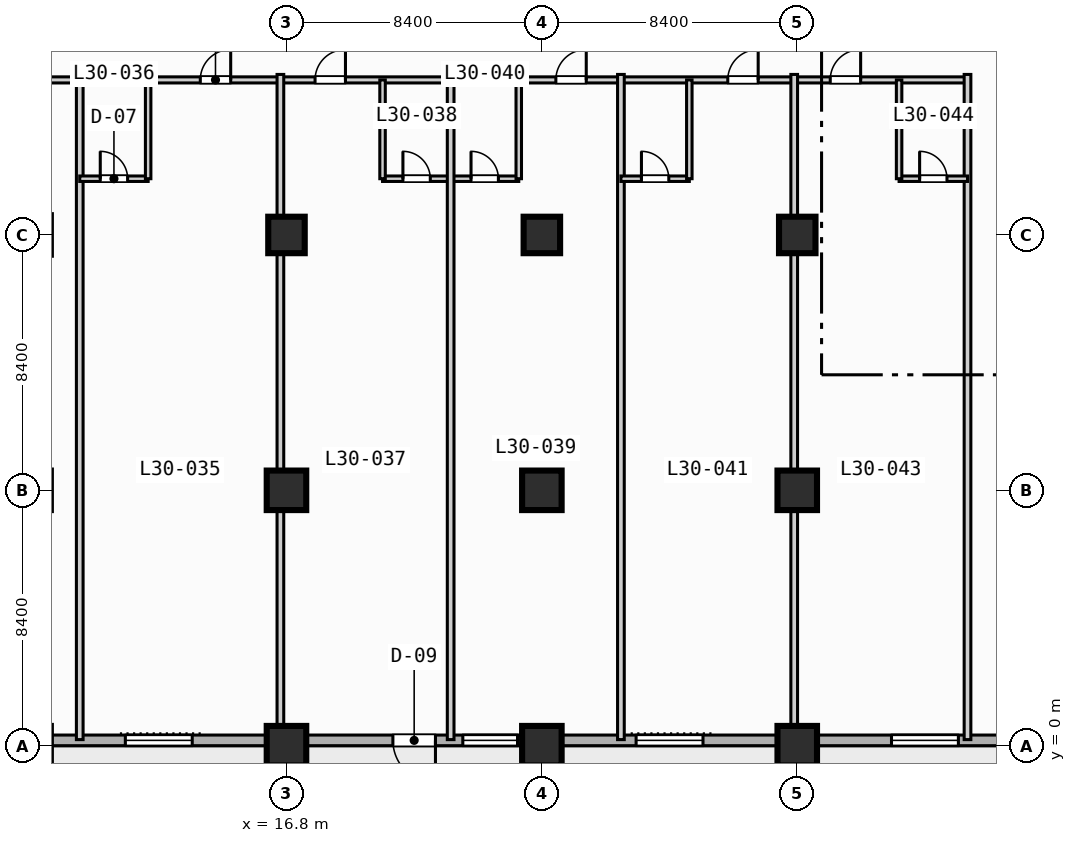
"""IFC4 building model, lengths in metres.
Left out: names, types, materials, properties, quantities, classifications, styles, units other than length and angle.
Written with IfcOpenShell. Run it as: python <this file> out.ifc"""

import sys

from ifc_helpers import new_model, si_unit, direction, frame, frame_2d, origin, origin_2d, place, context, subcontext, project, spatial, rectangle, extrude, element, fill, save


model = new_model("IFC4")
c1 = context("Model", 3, precision=1e-05, world=origin(), true_north=direction((0.0, 1.0)))
c2 = subcontext(c1, "Body", "Model", "MODEL_VIEW")
j1 = project(units=[si_unit("LENGTHUNIT", "METRE"), si_unit("PLANEANGLEUNIT", "RADIAN")], contexts=[c1])
p1 = place(None, origin())
s1 = spatial("IfcSite", under=j1, at=p1, CompositionType="ELEMENT")
p2 = place(p1, origin())
s2 = spatial("IfcBuilding", under=s1, at=p2, CompositionType="ELEMENT")
p3 = place(p2, frame((0.0, 0.0, 126.6)))
s3 = spatial("IfcBuildingStorey", under=s2, at=p3, CompositionType="ELEMENT", Elevation=126.6)
for number, where, z_axis, x_axis in (
    (1, (16.8, 0.0, 0.0), (0.0, 0.0, 1.0), (1.0, 0.0, 0.0)),
    (2, (16.8, 8.4, 0.0), (0.0, 0.0, 1.0), (1.0, 0.0, 0.0)),
):
    element("IfcColumn", number, at=place(p3, frame(where, z_axis=z_axis, x_axis=x_axis)), inside=s3, PredefinedType="COLUMN", context=c2, shape_type="SweptSolid", body=[
        extrude(rectangle(XDim=1.3, YDim=1.3, at=origin_2d()), origin(), (0.0, 0.0, 1.0), 3.8),
    ])
p4 = place(p3, frame((16.8, 16.8, 0.0), z_axis=(0.0, 0.0, 1.0), x_axis=(1.0, 0.0, 0.0)))
e3 = element("IfcColumn", 3, at=p4, inside=s3, PredefinedType="COLUMN", context=c2, shape_type="SweptSolid", body=[
    extrude(rectangle(XDim=1.2, YDim=1.2, at=origin_2d()), origin(), (0.0, 0.0, 1.0), 3.8),
])
for number, where, z_axis, x_axis in (
    (4, (25.2, 0.0, 0.0), (0.0, 0.0, 1.0), (1.0, 0.0, 0.0)),
    (5, (25.2, 8.4, 0.0), (0.0, 0.0, 1.0), (1.0, 0.0, 0.0)),
):
    element("IfcColumn", number, at=place(p3, frame(where, z_axis=z_axis, x_axis=x_axis)), inside=s3, PredefinedType="COLUMN", context=c2, shape_type="SweptSolid", body=[
        extrude(rectangle(XDim=1.3, YDim=1.3, at=origin_2d()), origin(), (0.0, 0.0, 1.0), 3.8),
    ])
p5 = place(p3, frame((25.2, 16.8, 0.0), z_axis=(0.0, 0.0, 1.0), x_axis=(1.0, 0.0, 0.0)))
e6 = element("IfcColumn", 6, at=p5, inside=s3, PredefinedType="COLUMN", context=c2, shape_type="SweptSolid", body=[
    extrude(rectangle(XDim=1.2, YDim=1.2, at=origin_2d()), origin(), (0.0, 0.0, 1.0), 3.8),
])
for number, where, z_axis, x_axis in (
    (7, (33.6, 0.0, 0.0), (0.0, 0.0, 1.0), (1.0, 0.0, 0.0)),
    (8, (33.6, 8.4, 0.0), (0.0, 0.0, 1.0), (1.0, 0.0, 0.0)),
):
    element("IfcColumn", number, at=place(p3, frame(where, z_axis=z_axis, x_axis=x_axis)), inside=s3, PredefinedType="COLUMN", context=c2, shape_type="SweptSolid", body=[
        extrude(rectangle(XDim=1.3, YDim=1.3, at=origin_2d()), origin(), (0.0, 0.0, 1.0), 3.8),
    ])
p6 = place(p3, frame((33.6, 16.8, 0.0), z_axis=(0.0, 0.0, 1.0), x_axis=(1.0, 0.0, 0.0)))
e9 = element("IfcColumn", 9, at=p6, inside=s3, PredefinedType="COLUMN", context=c2, shape_type="SweptSolid", body=[
    extrude(rectangle(XDim=1.2, YDim=1.2, at=origin_2d()), origin(), (0.0, 0.0, 1.0), 3.8),
])
p7 = place(p3, frame((72.425, 0.175, 0.0), z_axis=(0.0, 0.0, 1.0), x_axis=(-1.0, 0.0, 0.0)))
e10 = element("IfcWall", 10, at=p7, inside=s3, PredefinedType="STANDARD", context=c2, shape_type="SweptSolid", body=[
    extrude(rectangle(XDim=69.25, YDim=0.35, at=frame_2d((34.625, 0.0))), origin(), (0.0, 0.0, 1.0), 3.55),
])
p8 = place(p7, frame((50.725, 0.0, 0.0)))
e11 = element("IfcOpeningElement", 11, at=p8, cuts=e10, PredefinedType="OPENING", context=c2, shape_type="SweptSolid", body=[
    extrude(rectangle(XDim=1.4, YDim=2.2, at=frame_2d((0.7, 1.1))), frame((0.0, 0.185, 0.0), z_axis=(0.0, -1.0, 0.0), x_axis=(1.0, 0.0, 0.0)), (0.0, 0.0, 1.0), 0.37),
])
p9 = place(p7, frame((58.725, 0.0, 0.85)))
e12 = element("IfcOpeningElement", 12, at=p9, cuts=e10, PredefinedType="OPENING", context=c2, shape_type="SweptSolid", body=[
    extrude(rectangle(XDim=2.2, YDim=1.8, at=frame_2d((1.1, 0.9))), frame((0.0, 0.185, 0.0), z_axis=(0.0, -1.0, 0.0), x_axis=(1.0, 0.0, 0.0)), (0.0, 0.0, 1.0), 0.37),
])
p10 = place(p7, frame((41.925, 0.0, 0.85)))
e13 = element("IfcOpeningElement", 13, at=p10, cuts=e10, PredefinedType="OPENING", context=c2, shape_type="SweptSolid", body=[
    extrude(rectangle(XDim=2.2, YDim=1.8, at=frame_2d((1.1, 0.9))), frame((0.0, 0.185, 0.0), z_axis=(0.0, -1.0, 0.0), x_axis=(1.0, 0.0, 0.0)), (0.0, 0.0, 1.0), 0.37),
])
p11 = place(p7, frame((33.525, 0.0, 0.85)))
e14 = element("IfcOpeningElement", 14, at=p11, cuts=e10, PredefinedType="OPENING", context=c2, shape_type="SweptSolid", body=[
    extrude(rectangle(XDim=2.2, YDim=1.8, at=frame_2d((1.1, 0.9))), frame((0.0, 0.185, 0.0), z_axis=(0.0, -1.0, 0.0), x_axis=(1.0, 0.0, 0.0)), (0.0, 0.0, 1.0), 0.37),
])
p12 = place(p7, frame((25.125, 0.0, 0.85)))
e15 = element("IfcOpeningElement", 15, at=p12, cuts=e10, PredefinedType="OPENING", context=c2, shape_type="SweptSolid", body=[
    extrude(rectangle(XDim=2.2, YDim=1.8, at=frame_2d((1.1, 0.9))), frame((0.0, 0.185, 0.0), z_axis=(0.0, -1.0, 0.0), x_axis=(1.0, 0.0, 0.0)), (0.0, 0.0, 1.0), 0.37),
])
p13 = place(p7, frame((64.825, 0.0, 0.85)))
e16 = element("IfcOpeningElement", 16, at=p13, cuts=e10, PredefinedType="OPENING", context=c2, shape_type="SweptSolid", body=[
    extrude(rectangle(XDim=1.8, YDim=1.8, at=frame_2d((0.9, 0.9))), frame((0.0, 0.185, 0.0), z_axis=(0.0, -1.0, 0.0), x_axis=(1.0, 0.0, 0.0)), (0.0, 0.0, 1.0), 0.37),
])
p14 = place(p7, frame((48.025, 0.0, 0.85)))
e17 = element("IfcOpeningElement", 17, at=p14, cuts=e10, PredefinedType="OPENING", context=c2, shape_type="SweptSolid", body=[
    extrude(rectangle(XDim=1.8, YDim=1.8, at=frame_2d((0.9, 0.9))), frame((0.0, 0.185, 0.0), z_axis=(0.0, -1.0, 0.0), x_axis=(1.0, 0.0, 0.0)), (0.0, 0.0, 1.0), 0.37),
])
p15 = place(p3, frame((3.4, 21.9, 0.0), z_axis=(0.0, 0.0, 1.0), x_axis=(1.0, 0.0, 0.0)))
e18 = element("IfcWall", 18, at=p15, inside=s3, PredefinedType="PARTITIONING", context=c2, shape_type="SweptSolid", body=[
    extrude(rectangle(XDim=35.8, YDim=0.2, at=frame_2d((17.9, 0.0))), origin(), (0.0, 0.0, 1.0), 3.55),
])
p16 = place(p15, frame((3.965, 0.0, 0.0)))
e19 = element("IfcOpeningElement", 19, at=p16, cuts=e18, PredefinedType="OPENING", context=c2, shape_type="SweptSolid", body=[
    extrude(rectangle(XDim=1.0, YDim=2.15, at=frame_2d((0.5, 1.075))), frame((0.0, 0.11, 0.0), z_axis=(0.0, -1.0, 0.0), x_axis=(1.0, 0.0, 0.0)), (0.0, 0.0, 1.0), 0.22),
])
p17 = place(p15, frame((10.565, 0.0, 0.0)))
e20 = element("IfcOpeningElement", 20, at=p17, cuts=e18, PredefinedType="OPENING", context=c2, shape_type="SweptSolid", body=[
    extrude(rectangle(XDim=1.0, YDim=2.15, at=frame_2d((0.5, 1.075))), frame((0.0, 0.11, 0.0), z_axis=(0.0, -1.0, 0.0), x_axis=(1.0, 0.0, 0.0)), (0.0, 0.0, 1.0), 0.22),
])
p18 = place(p15, frame((14.34, 0.0, 0.0)))
e21 = element("IfcOpeningElement", 21, at=p18, cuts=e18, PredefinedType="OPENING", context=c2, shape_type="SweptSolid", body=[
    extrude(rectangle(XDim=1.0, YDim=2.15, at=frame_2d((0.5, 1.075))), frame((0.0, 0.11, 0.0), z_axis=(0.0, -1.0, 0.0), x_axis=(1.0, 0.0, 0.0)), (0.0, 0.0, 1.0), 0.22),
])
p19 = place(p15, frame((22.26, 0.0, 0.0)))
e22 = element("IfcOpeningElement", 22, at=p19, cuts=e18, PredefinedType="OPENING", context=c2, shape_type="SweptSolid", body=[
    extrude(rectangle(XDim=1.0, YDim=2.15, at=frame_2d((0.5, 1.075))), frame((0.0, 0.11, 0.0), z_axis=(0.0, -1.0, 0.0), x_axis=(1.0, 0.0, 0.0)), (0.0, 0.0, 1.0), 0.22),
])
p20 = place(p15, frame((27.915, 0.0, 0.0)))
e23 = element("IfcOpeningElement", 23, at=p20, cuts=e18, PredefinedType="OPENING", context=c2, shape_type="SweptSolid", body=[
    extrude(rectangle(XDim=1.0, YDim=2.15, at=frame_2d((0.5, 1.075))), frame((0.0, 0.11, 0.0), z_axis=(0.0, -1.0, 0.0), x_axis=(1.0, 0.0, 0.0)), (0.0, 0.0, 1.0), 0.22),
])
p21 = place(p15, frame((31.285, 0.0, 0.0)))
e24 = element("IfcOpeningElement", 24, at=p21, cuts=e18, PredefinedType="OPENING", context=c2, shape_type="SweptSolid", body=[
    extrude(rectangle(XDim=1.0, YDim=2.15, at=frame_2d((0.5, 1.075))), frame((0.0, 0.11, 0.0), z_axis=(0.0, -1.0, 0.0), x_axis=(1.0, 0.0, 0.0)), (0.0, 0.0, 1.0), 0.22),
])
p22 = place(p3, frame((10.0, 0.2, 0.0), z_axis=(0.0, 0.0, 1.0), x_axis=(0.0, 1.0, 0.0)))
e25 = element("IfcWall", 25, at=p22, inside=s3, PredefinedType="PARTITIONING", context=c2, shape_type="SweptSolid", body=[
    extrude(rectangle(XDim=21.88, YDim=0.22, at=frame_2d((10.94, 0.0))), origin(), (0.0, 0.0, 1.0), 3.55),
])
p23 = place(p3, frame((10.0, 18.65, 0.0), z_axis=(0.0, 0.0, 1.0), x_axis=(1.0, 0.0, 0.0)))
e26 = element("IfcWall", 26, at=p23, inside=s3, PredefinedType="PLUMBINGWALL", context=c2, shape_type="SweptSolid", body=[
    extrude(rectangle(XDim=2.25, YDim=0.18, at=frame_2d((1.125, 0.0))), origin(), (0.0, 0.0, 1.0), 3.55),
])
p24 = place(p23, frame((0.675, 0.0, 0.0)))
e27 = element("IfcOpeningElement", 27, at=p24, cuts=e26, PredefinedType="OPENING", context=c2, shape_type="SweptSolid", body=[
    extrude(rectangle(XDim=0.9, YDim=2.1, at=frame_2d((0.45, 1.05))), frame((0.0, 0.1, 0.0), z_axis=(0.0, -1.0, 0.0), x_axis=(1.0, 0.0, 0.0)), (0.0, 0.0, 1.0), 0.2),
])
p25 = place(p3, frame((12.25, 18.65, 0.0), z_axis=(0.0, 0.0, 1.0), x_axis=(0.0, 1.0, 0.0)))
e28 = element("IfcWall", 28, at=p25, inside=s3, PredefinedType="PLUMBINGWALL", context=c2, shape_type="SweptSolid", body=[
    extrude(rectangle(XDim=3.25, YDim=0.18, at=frame_2d((1.625, 0.0))), origin(), (0.0, 0.0, 1.0), 3.55),
])
p26 = place(p3, frame((16.6, 0.2, 0.0), z_axis=(0.0, 0.0, 1.0), x_axis=(0.0, 1.0, 0.0)))
e29 = element("IfcWall", 29, at=p26, inside=s3, PredefinedType="PARTITIONING", context=c2, shape_type="SweptSolid", body=[
    extrude(rectangle(XDim=21.88, YDim=0.22, at=frame_2d((10.94, 0.0))), origin(), (0.0, 0.0, 1.0), 2.8),
])
p27 = place(p3, frame((19.96, 18.65, 0.0), z_axis=(0.0, 0.0, 1.0), x_axis=(1.0, 0.0, 0.0)))
e30 = element("IfcWall", 30, at=p27, inside=s3, PredefinedType="PLUMBINGWALL", context=c2, shape_type="SweptSolid", body=[
    extrude(rectangle(XDim=4.48, YDim=0.18, at=frame_2d((2.24, 0.0))), origin(), (0.0, 0.0, 1.0), 3.55),
])
p28 = place(p27, frame((0.67, 0.0, 0.0)))
e31 = element("IfcOpeningElement", 31, at=p28, cuts=e30, PredefinedType="OPENING", context=c2, shape_type="SweptSolid", body=[
    extrude(rectangle(XDim=0.9, YDim=2.1, at=frame_2d((0.45, 1.05))), frame((0.0, 0.1, 0.0), z_axis=(0.0, -1.0, 0.0), x_axis=(1.0, 0.0, 0.0)), (0.0, 0.0, 1.0), 0.2),
])
p29 = place(p27, frame((2.91, 0.0, 0.0)))
e32 = element("IfcOpeningElement", 32, at=p29, cuts=e30, PredefinedType="OPENING", context=c2, shape_type="SweptSolid", body=[
    extrude(rectangle(XDim=0.9, YDim=2.1, at=frame_2d((0.45, 1.05))), frame((0.0, 0.1, 0.0), z_axis=(0.0, -1.0, 0.0), x_axis=(1.0, 0.0, 0.0)), (0.0, 0.0, 1.0), 0.2),
])
p30 = place(p3, frame((19.96, 18.65, 0.0), z_axis=(0.0, 0.0, 1.0), x_axis=(0.0, 1.0, 0.0)))
e33 = element("IfcWall", 33, at=p30, inside=s3, PredefinedType="PLUMBINGWALL", context=c2, shape_type="SweptSolid", body=[
    extrude(rectangle(XDim=3.25, YDim=0.18, at=frame_2d((1.625, 0.0))), origin(), (0.0, 0.0, 1.0), 3.55),
])
p31 = place(p3, frame((22.2, 0.2, 0.0), z_axis=(0.0, 0.0, 1.0), x_axis=(0.0, 1.0, 0.0)))
e34 = element("IfcWall", 34, at=p31, inside=s3, PredefinedType="PARTITIONING", context=c2, shape_type="SweptSolid", body=[
    extrude(rectangle(XDim=21.88, YDim=0.22, at=frame_2d((10.94, 0.0))), origin(), (0.0, 0.0, 1.0), 3.55),
])
p32 = place(p3, frame((24.44, 18.65, 0.0), z_axis=(0.0, 0.0, 1.0), x_axis=(0.0, 1.0, 0.0)))
e35 = element("IfcWall", 35, at=p32, inside=s3, PredefinedType="PLUMBINGWALL", context=c2, shape_type="SweptSolid", body=[
    extrude(rectangle(XDim=3.25, YDim=0.18, at=frame_2d((1.625, 0.0))), origin(), (0.0, 0.0, 1.0), 3.55),
])
p33 = place(p3, frame((27.8, 0.2, 0.0), z_axis=(0.0, 0.0, 1.0), x_axis=(0.0, 1.0, 0.0)))
e36 = element("IfcWall", 36, at=p33, inside=s3, PredefinedType="PARTITIONING", context=c2, shape_type="SweptSolid", body=[
    extrude(rectangle(XDim=21.88, YDim=0.22, at=frame_2d((10.94, 0.0))), origin(), (0.0, 0.0, 1.0), 3.55),
])
p34 = place(p3, frame((27.8, 18.65, 0.0), z_axis=(0.0, 0.0, 1.0), x_axis=(1.0, 0.0, 0.0)))
e37 = element("IfcWall", 37, at=p34, inside=s3, PredefinedType="PLUMBINGWALL", context=c2, shape_type="SweptSolid", body=[
    extrude(rectangle(XDim=2.25, YDim=0.18, at=frame_2d((1.125, 0.0))), origin(), (0.0, 0.0, 1.0), 3.55),
])
p35 = place(p34, frame((0.675, 0.0, 0.0)))
e38 = element("IfcOpeningElement", 38, at=p35, cuts=e37, PredefinedType="OPENING", context=c2, shape_type="SweptSolid", body=[
    extrude(rectangle(XDim=0.9, YDim=2.1, at=frame_2d((0.45, 1.05))), frame((0.0, 0.1, 0.0), z_axis=(0.0, -1.0, 0.0), x_axis=(1.0, 0.0, 0.0)), (0.0, 0.0, 1.0), 0.2),
])
p36 = place(p3, frame((30.05, 18.65, 0.0), z_axis=(0.0, 0.0, 1.0), x_axis=(0.0, 1.0, 0.0)))
e39 = element("IfcWall", 39, at=p36, inside=s3, PredefinedType="PLUMBINGWALL", context=c2, shape_type="SweptSolid", body=[
    extrude(rectangle(XDim=3.25, YDim=0.18, at=frame_2d((1.625, 0.0))), origin(), (0.0, 0.0, 1.0), 3.55),
])
p37 = place(p3, frame((33.5, 0.2, 0.0), z_axis=(0.0, 0.0, 1.0), x_axis=(0.0, 1.0, 0.0)))
e40 = element("IfcWall", 40, at=p37, inside=s3, PredefinedType="PARTITIONING", context=c2, shape_type="SweptSolid", body=[
    extrude(rectangle(XDim=21.88, YDim=0.22, at=frame_2d((10.94, 0.0))), origin(), (0.0, 0.0, 1.0), 2.8),
])
p38 = place(p3, frame((39.2, 0.2, 0.0), z_axis=(0.0, 0.0, 1.0), x_axis=(0.0, 1.0, 0.0)))
e41 = element("IfcWall", 41, at=p38, inside=s3, PredefinedType="PARTITIONING", context=c2, shape_type="SweptSolid", body=[
    extrude(rectangle(XDim=21.88, YDim=0.22, at=frame_2d((10.94, 0.0))), origin(), (0.0, 0.0, 1.0), 3.55),
])
p39 = place(p3, frame((36.95, 18.65, 0.0), z_axis=(0.0, 0.0, 1.0), x_axis=(1.0, 0.0, 0.0)))
e42 = element("IfcWall", 42, at=p39, inside=s3, PredefinedType="PLUMBINGWALL", context=c2, shape_type="SweptSolid", body=[
    extrude(rectangle(XDim=2.25, YDim=0.18, at=frame_2d((1.125, 0.0))), origin(), (0.0, 0.0, 1.0), 3.55),
])
p40 = place(p39, frame((0.675, 0.0, 0.0)))
e43 = element("IfcOpeningElement", 43, at=p40, cuts=e42, PredefinedType="OPENING", context=c2, shape_type="SweptSolid", body=[
    extrude(rectangle(XDim=0.9, YDim=2.1, at=frame_2d((0.45, 1.05))), frame((0.0, 0.1, 0.0), z_axis=(0.0, -1.0, 0.0), x_axis=(1.0, 0.0, 0.0)), (0.0, 0.0, 1.0), 0.2),
])
p41 = place(p3, frame((36.95, 18.65, 0.0), z_axis=(0.0, 0.0, 1.0), x_axis=(0.0, 1.0, 0.0)))
e44 = element("IfcWall", 44, at=p41, inside=s3, PredefinedType="PLUMBINGWALL", context=c2, shape_type="SweptSolid", body=[
    extrude(rectangle(XDim=3.25, YDim=0.18, at=frame_2d((1.625, 0.0))), origin(), (0.0, 0.0, 1.0), 3.55),
])
p42 = place(p8, origin())
e45 = element("IfcDoor", 45, at=p42, inside=s3, OperationType="SINGLE_SWING_LEFT", PredefinedType="DOOR", context=c2, shape_type="SweptSolid", body=[
    extrude(rectangle(XDim=1.4, YDim=2.2, at=frame_2d((0.7, 1.1))), frame((0.0, 0.025, 0.0), z_axis=(0.0, -1.0, 0.0), x_axis=(1.0, 0.0, 0.0)), (0.0, 0.0, 1.0), 0.05),
])
fill(e11, e45)
p43 = place(p9, origin())
e46 = element("IfcWindow", 46, at=p43, inside=s3, PartitioningType="SINGLE_PANEL", PredefinedType="WINDOW", context=c2, shape_type="SweptSolid", body=[
    extrude(rectangle(XDim=2.2, YDim=1.8, at=frame_2d((1.1, 0.9))), frame((0.0, 0.03, 0.0), z_axis=(0.0, -1.0, 0.0), x_axis=(1.0, 0.0, 0.0)), (0.0, 0.0, 1.0), 0.06),
])
fill(e12, e46)
p44 = place(p10, origin())
e47 = element("IfcWindow", 47, at=p44, inside=s3, PartitioningType="SINGLE_PANEL", PredefinedType="WINDOW", context=c2, shape_type="SweptSolid", body=[
    extrude(rectangle(XDim=2.2, YDim=1.8, at=frame_2d((1.1, 0.9))), frame((0.0, 0.03, 0.0), z_axis=(0.0, -1.0, 0.0), x_axis=(1.0, 0.0, 0.0)), (0.0, 0.0, 1.0), 0.06),
])
fill(e13, e47)
p45 = place(p11, origin())
e48 = element("IfcWindow", 48, at=p45, inside=s3, PartitioningType="SINGLE_PANEL", PredefinedType="WINDOW", context=c2, shape_type="SweptSolid", body=[
    extrude(rectangle(XDim=2.2, YDim=1.8, at=frame_2d((1.1, 0.9))), frame((0.0, 0.03, 0.0), z_axis=(0.0, -1.0, 0.0), x_axis=(1.0, 0.0, 0.0)), (0.0, 0.0, 1.0), 0.06),
])
fill(e14, e48)
p46 = place(p14, origin())
e49 = element("IfcWindow", 49, at=p46, inside=s3, PartitioningType="SINGLE_PANEL", PredefinedType="WINDOW", context=c2, shape_type="SweptSolid", body=[
    extrude(rectangle(XDim=1.8, YDim=1.8, at=frame_2d((0.9, 0.9))), frame((0.0, 0.03, 0.0), z_axis=(0.0, -1.0, 0.0), x_axis=(1.0, 0.0, 0.0)), (0.0, 0.0, 1.0), 0.06),
])
fill(e17, e49)
p47 = place(p17, origin())
e50 = element("IfcDoor", 50, at=p47, inside=s3, OperationType="SINGLE_SWING_RIGHT", PredefinedType="DOOR", context=c2, shape_type="SweptSolid", body=[
    extrude(rectangle(XDim=1.0, YDim=2.15, at=frame_2d((0.5, 1.075))), frame((0.0, 0.025, 0.0), z_axis=(0.0, -1.0, 0.0), x_axis=(1.0, 0.0, 0.0)), (0.0, 0.0, 1.0), 0.05),
])
fill(e20, e50)
p48 = place(p18, origin())
e51 = element("IfcDoor", 51, at=p48, inside=s3, OperationType="SINGLE_SWING_RIGHT", PredefinedType="DOOR", context=c2, shape_type="SweptSolid", body=[
    extrude(rectangle(XDim=1.0, YDim=2.15, at=frame_2d((0.5, 1.075))), frame((0.0, 0.025, 0.0), z_axis=(0.0, -1.0, 0.0), x_axis=(1.0, 0.0, 0.0)), (0.0, 0.0, 1.0), 0.05),
])
fill(e21, e51)
p49 = place(p19, origin())
e52 = element("IfcDoor", 52, at=p49, inside=s3, OperationType="SINGLE_SWING_RIGHT", PredefinedType="DOOR", context=c2, shape_type="SweptSolid", body=[
    extrude(rectangle(XDim=1.0, YDim=2.15, at=frame_2d((0.5, 1.075))), frame((0.0, 0.025, 0.0), z_axis=(0.0, -1.0, 0.0), x_axis=(1.0, 0.0, 0.0)), (0.0, 0.0, 1.0), 0.05),
])
fill(e22, e52)
p50 = place(p20, origin())
e53 = element("IfcDoor", 53, at=p50, inside=s3, OperationType="SINGLE_SWING_RIGHT", PredefinedType="DOOR", context=c2, shape_type="SweptSolid", body=[
    extrude(rectangle(XDim=1.0, YDim=2.15, at=frame_2d((0.5, 1.075))), frame((0.0, 0.025, 0.0), z_axis=(0.0, -1.0, 0.0), x_axis=(1.0, 0.0, 0.0)), (0.0, 0.0, 1.0), 0.05),
])
fill(e23, e53)
p51 = place(p21, origin())
e54 = element("IfcDoor", 54, at=p51, inside=s3, OperationType="SINGLE_SWING_RIGHT", PredefinedType="DOOR", context=c2, shape_type="SweptSolid", body=[
    extrude(rectangle(XDim=1.0, YDim=2.15, at=frame_2d((0.5, 1.075))), frame((0.0, 0.025, 0.0), z_axis=(0.0, -1.0, 0.0), x_axis=(1.0, 0.0, 0.0)), (0.0, 0.0, 1.0), 0.05),
])
fill(e24, e54)
p52 = place(p24, origin())
e55 = element("IfcDoor", 55, at=p52, inside=s3, OperationType="SINGLE_SWING_LEFT", PredefinedType="DOOR", context=c2, shape_type="SweptSolid", body=[
    extrude(rectangle(XDim=0.9, YDim=2.1, at=frame_2d((0.45, 1.05))), frame((0.0, 0.025, 0.0), z_axis=(0.0, -1.0, 0.0), x_axis=(1.0, 0.0, 0.0)), (0.0, 0.0, 1.0), 0.05),
])
fill(e27, e55)
p53 = place(p28, origin())
e56 = element("IfcDoor", 56, at=p53, inside=s3, OperationType="SINGLE_SWING_LEFT", PredefinedType="DOOR", context=c2, shape_type="SweptSolid", body=[
    extrude(rectangle(XDim=0.9, YDim=2.1, at=frame_2d((0.45, 1.05))), frame((0.0, 0.025, 0.0), z_axis=(0.0, -1.0, 0.0), x_axis=(1.0, 0.0, 0.0)), (0.0, 0.0, 1.0), 0.05),
])
fill(e31, e56)
p54 = place(p29, origin())
e57 = element("IfcDoor", 57, at=p54, inside=s3, OperationType="SINGLE_SWING_LEFT", PredefinedType="DOOR", context=c2, shape_type="SweptSolid", body=[
    extrude(rectangle(XDim=0.9, YDim=2.1, at=frame_2d((0.45, 1.05))), frame((0.0, 0.025, 0.0), z_axis=(0.0, -1.0, 0.0), x_axis=(1.0, 0.0, 0.0)), (0.0, 0.0, 1.0), 0.05),
])
fill(e32, e57)
p55 = place(p35, origin())
e58 = element("IfcDoor", 58, at=p55, inside=s3, OperationType="SINGLE_SWING_LEFT", PredefinedType="DOOR", context=c2, shape_type="SweptSolid", body=[
    extrude(rectangle(XDim=0.9, YDim=2.1, at=frame_2d((0.45, 1.05))), frame((0.0, 0.025, 0.0), z_axis=(0.0, -1.0, 0.0), x_axis=(1.0, 0.0, 0.0)), (0.0, 0.0, 1.0), 0.05),
])
fill(e38, e58)
p56 = place(p40, origin())
e59 = element("IfcDoor", 59, at=p56, inside=s3, OperationType="SINGLE_SWING_LEFT", PredefinedType="DOOR", context=c2, shape_type="SweptSolid", body=[
    extrude(rectangle(XDim=0.9, YDim=2.1, at=frame_2d((0.45, 1.05))), frame((0.0, 0.025, 0.0), z_axis=(0.0, -1.0, 0.0), x_axis=(1.0, 0.0, 0.0)), (0.0, 0.0, 1.0), 0.05),
])
fill(e43, e59)
save(model, sys.argv[1])
